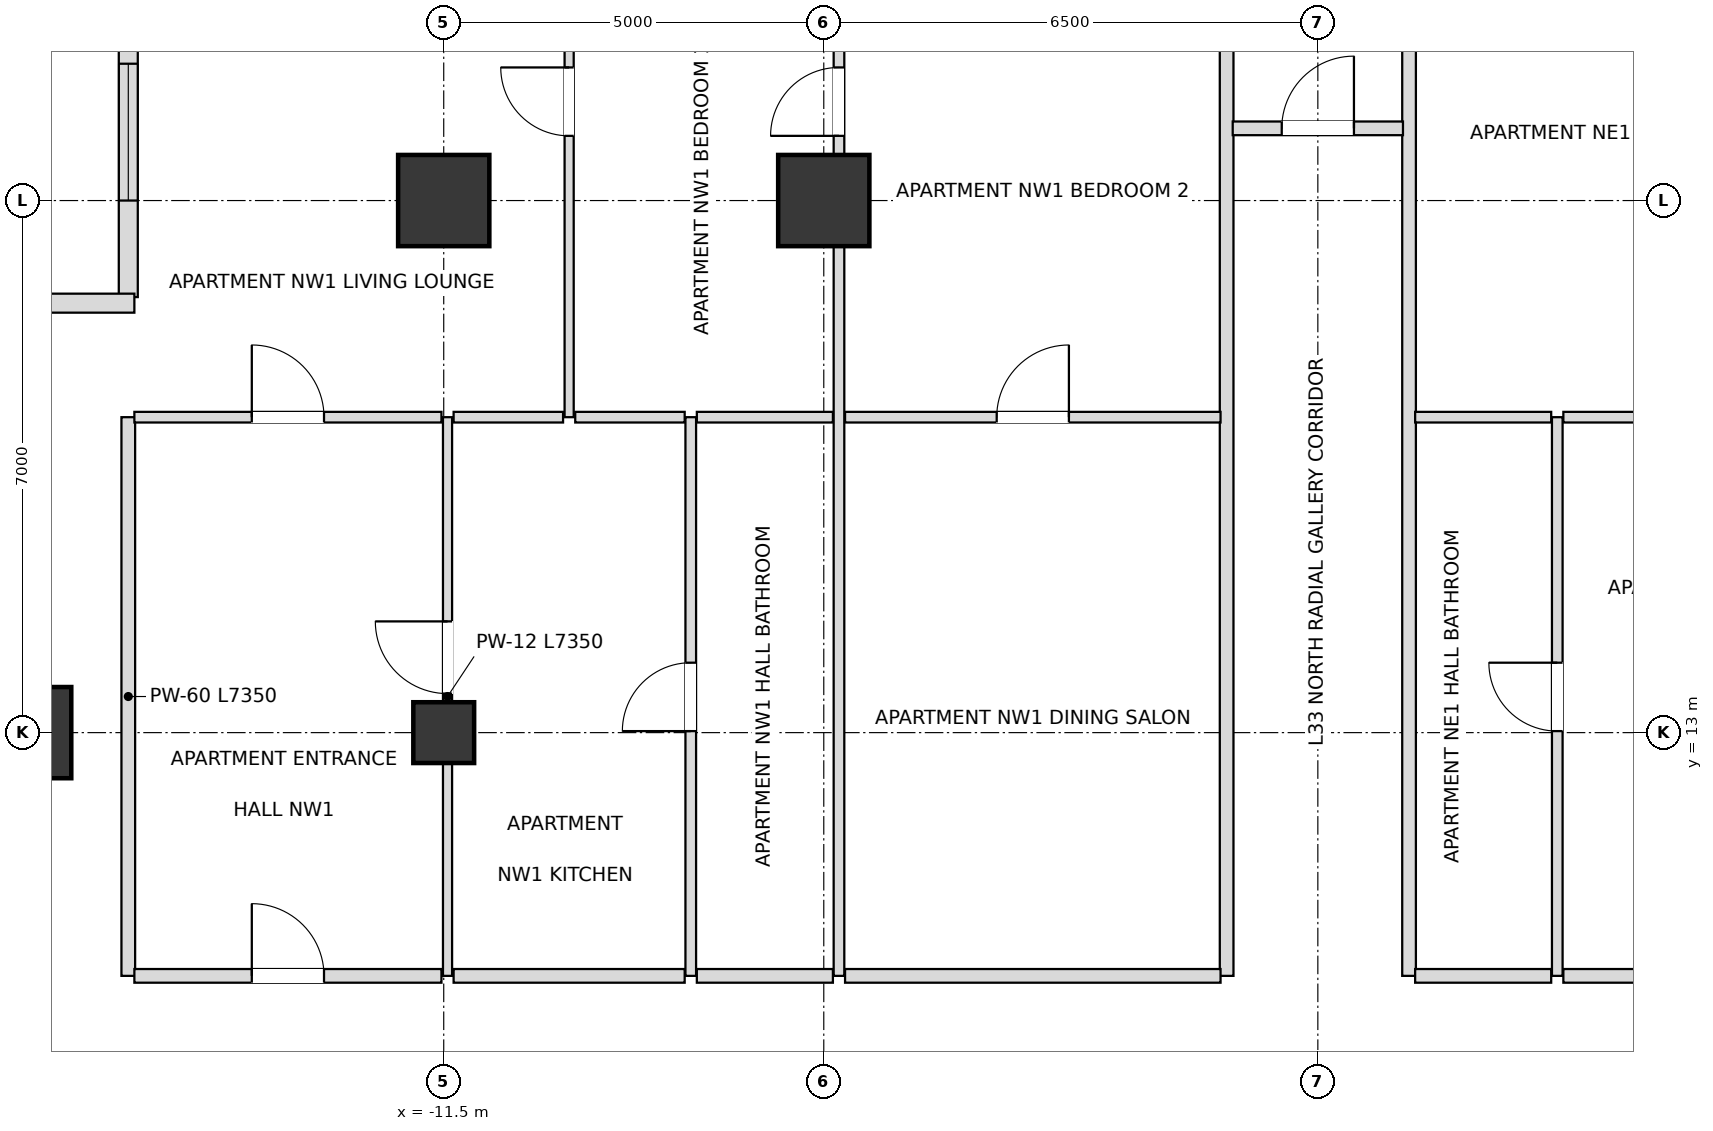
"""IFC4 building model, lengths in metres.
Left out: names, types, materials, properties, quantities, classifications, styles, units other than length and angle.
Written with IfcOpenShell. Run it as: python <this file> out.ifc"""

import sys

from ifc_helpers import new_model, si_unit, direction, frame, frame_2d, origin, origin_2d, place, context, subcontext, project, spatial, rectangle, extrude, element, fill, save


model = new_model("IFC4")
c1 = context("Model", 3, precision=1e-05, world=origin(), true_north=direction((0.0, 1.0)))
c2 = subcontext(c1, "Body", "Model", "MODEL_VIEW")
j1 = project(units=[si_unit("LENGTHUNIT", "METRE"), si_unit("PLANEANGLEUNIT", "RADIAN")], contexts=[c1])
p1 = place(None, origin())
s1 = spatial("IfcSite", under=j1, at=p1, CompositionType="ELEMENT")
p2 = place(p1, origin())
s2 = spatial("IfcBuilding", under=s1, at=p2, CompositionType="ELEMENT")
p3 = place(p2, frame((0.0, 0.0, 133.2)))
s3 = spatial("IfcBuildingStorey", under=s2, at=p3, CompositionType="ELEMENT", Elevation=133.2)
for number, where, z_axis, x_axis in (
    (1, (-6.5, 20.0, 0.0), (0.0, 0.0, 1.0), (1.0, 0.0, 0.0)),
    (2, (-11.5, 20.0, 0.0), (0.0, 0.0, 1.0), (1.0, 0.0, 0.0)),
    (3, (-17.0, 13.0, 0.0), (0.0, 0.0, 1.0), (1.0, 0.0, 0.0)),
):
    element("IfcColumn", number, at=place(p3, frame(where, z_axis=z_axis, x_axis=x_axis)), inside=s3, PredefinedType="USERDEFINED", context=c2, shape_type="SweptSolid", body=[
        extrude(rectangle(XDim=1.2, YDim=1.2, at=origin_2d()), origin(), (0.0, 0.0, 1.0), 3.6),
    ])
p4 = place(p3, frame((-11.5, 13.0, 0.0), z_axis=(0.0, 0.0, 1.0), x_axis=(1.0, 0.0, 0.0)))
e4 = element("IfcColumn", 4, at=p4, inside=s3, PredefinedType="COLUMN", context=c2, shape_type="SweptSolid", body=[
    extrude(rectangle(XDim=0.8, YDim=0.8, at=origin_2d()), origin(), (0.0, 0.0, 1.0), 3.6),
])
p5 = place(p3, frame((-15.65, 23.07, 0.0), z_axis=(0.0, 0.0, 1.0), x_axis=(0.0, -1.0, 0.0)))
e5 = element("IfcWall", 5, at=p5, inside=s3, PredefinedType="SOLIDWALL", context=c2, shape_type="SweptSolid", body=[
    extrude(rectangle(XDim=4.34, YDim=0.25, at=frame_2d((2.17, 0.0))), origin(), (0.0, 0.0, 1.0), 2.736),
])
p6 = place(p5, frame((1.27, 0.0, 0.72)))
e6 = element("IfcOpeningElement", 6, at=p6, cuts=e5, PredefinedType="OPENING", context=c2, shape_type="SweptSolid", body=[
    extrude(rectangle(XDim=1.8, YDim=1.68, at=frame_2d((0.9, 0.84))), frame((0.0, 0.135, 0.0), z_axis=(0.0, -1.0, 0.0), x_axis=(1.0, 0.0, 0.0)), (0.0, 0.0, 1.0), 0.27),
])
p7 = place(p3, frame((-15.57, 18.65, 0.0), z_axis=(0.0, 0.0, 1.0), x_axis=(-1.0, 0.0, 0.0)))
e7 = element("IfcWall", 7, at=p7, inside=s3, PredefinedType="SOLIDWALL", context=c2, shape_type="SweptSolid", body=[
    extrude(rectangle(XDim=4.66, YDim=0.25, at=frame_2d((2.33, 0.0))), origin(), (0.0, 0.0, 1.0), 2.736),
])
p8 = place(p7, frame((1.43, 0.0, 0.72)))
e8 = element("IfcOpeningElement", 8, at=p8, cuts=e7, PredefinedType="OPENING", context=c2, shape_type="SweptSolid", body=[
    extrude(rectangle(XDim=1.8, YDim=1.68, at=frame_2d((0.9, 0.84))), frame((0.0, 0.135, 0.0), z_axis=(0.0, -1.0, 0.0), x_axis=(1.0, 0.0, 0.0)), (0.0, 0.0, 1.0), 0.27),
])
p9 = place(p3, frame((-15.65, 9.8, 0.0), z_axis=(0.0, 0.0, 1.0), x_axis=(0.0, 1.0, 0.0)))
e9 = element("IfcWall", 9, at=p9, inside=s3, PredefinedType="PARTITIONING", context=c2, shape_type="SweptSolid", body=[
    extrude(rectangle(XDim=7.35, YDim=0.18, at=frame_2d((3.675, 0.0))), origin(), (0.0, 0.0, 1.0), 2.736),
])
p10 = place(p3, frame((-11.45, 9.8, 0.0), z_axis=(0.0, 0.0, 1.0), x_axis=(0.0, 1.0, 0.0)))
e10 = element("IfcWall", 10, at=p10, inside=s3, PredefinedType="PARTITIONING", context=c2, shape_type="SweptSolid", body=[
    extrude(rectangle(XDim=7.35, YDim=0.12, at=frame_2d((3.675, 0.0))), origin(), (0.0, 0.0, 1.0), 2.736),
])
p11 = place(p10, frame((3.713, 0.0, 0.0)))
e11 = element("IfcOpeningElement", 11, at=p11, cuts=e10, PredefinedType="OPENING", context=c2, shape_type="SweptSolid", body=[
    extrude(rectangle(XDim=0.95, YDim=2.1, at=frame_2d((0.475, 1.05))), frame((0.0, 0.07, 0.0), z_axis=(0.0, -1.0, 0.0), x_axis=(1.0, 0.0, 0.0)), (0.0, 0.0, 1.0), 0.14),
])
p12 = place(p3, frame((-9.85, 17.15, 0.0), z_axis=(0.0, 0.0, 1.0), x_axis=(0.0, 1.0, 0.0)))
e12 = element("IfcWall", 12, at=p12, inside=s3, PredefinedType="PARTITIONING", context=c2, shape_type="SweptSolid", body=[
    extrude(rectangle(XDim=6.0, YDim=0.12, at=frame_2d((3.0, 0.0))), origin(), (0.0, 0.0, 1.0), 2.816),
])
p13 = place(p12, frame((3.701, 0.0, 0.0)))
e13 = element("IfcOpeningElement", 13, at=p13, cuts=e12, PredefinedType="OPENING", context=c2, shape_type="SweptSolid", body=[
    extrude(rectangle(XDim=0.9, YDim=2.1, at=frame_2d((0.45, 1.05))), frame((0.0, 0.07, 0.0), z_axis=(0.0, -1.0, 0.0), x_axis=(1.0, 0.0, 0.0)), (0.0, 0.0, 1.0), 0.14),
])
p14 = place(p3, frame((-8.25, 9.8, 0.0), z_axis=(0.0, 0.0, 1.0), x_axis=(0.0, 1.0, 0.0)))
e14 = element("IfcWall", 14, at=p14, inside=s3, PredefinedType="PARTITIONING", context=c2, shape_type="SweptSolid", body=[
    extrude(rectangle(XDim=7.35, YDim=0.14, at=frame_2d((3.675, 0.0))), origin(), (0.0, 0.0, 1.0), 2.816),
])
p15 = place(p14, frame((3.22, 0.0, 0.0)))
e15 = element("IfcOpeningElement", 15, at=p15, cuts=e14, PredefinedType="OPENING", context=c2, shape_type="SweptSolid", body=[
    extrude(rectangle(XDim=0.9, YDim=2.1, at=frame_2d((0.45, 1.05))), frame((0.0, 0.08, 0.0), z_axis=(0.0, -1.0, 0.0), x_axis=(1.0, 0.0, 0.0)), (0.0, 0.0, 1.0), 0.16),
])
p16 = place(p3, frame((-6.3, 9.8, 0.0), z_axis=(0.0, 0.0, 1.0), x_axis=(0.0, 1.0, 0.0)))
e16 = element("IfcWall", 16, at=p16, inside=s3, PredefinedType="PARTITIONING", context=c2, shape_type="SweptSolid", body=[
    extrude(rectangle(XDim=13.35, YDim=0.14, at=frame_2d((6.675, 0.0))), origin(), (0.0, 0.0, 1.0), 2.816),
])
p17 = place(p16, frame((11.051, 0.0, 0.0)))
e17 = element("IfcOpeningElement", 17, at=p17, cuts=e16, PredefinedType="OPENING", context=c2, shape_type="SweptSolid", body=[
    extrude(rectangle(XDim=0.9, YDim=2.1, at=frame_2d((0.45, 1.05))), frame((0.0, 0.08, 0.0), z_axis=(0.0, -1.0, 0.0), x_axis=(1.0, 0.0, 0.0)), (0.0, 0.0, 1.0), 0.16),
])
for number, where, z_axis, x_axis in (
    (18, (-1.2, 9.8, 0.0), (0.0, 0.0, 1.0), (0.0, 1.0, 0.0)),
    (19, (1.2, 9.8, 0.0), (0.0, 0.0, 1.0), (0.0, 1.0, 0.0)),
):
    element("IfcWall", number, at=place(p3, frame(where, z_axis=z_axis, x_axis=x_axis)), inside=s3, PredefinedType="PARTITIONING", context=c2, shape_type="SweptSolid", body=[
        extrude(rectangle(XDim=13.35, YDim=0.18, at=frame_2d((6.675, 0.0))), origin(), (0.0, 0.0, 1.0), 2.816),
    ])
p18 = place(p3, frame((3.15, 9.8, 0.0), z_axis=(0.0, 0.0, 1.0), x_axis=(0.0, 1.0, 0.0)))
e20 = element("IfcWall", 20, at=p18, inside=s3, PredefinedType="PARTITIONING", context=c2, shape_type="SweptSolid", body=[
    extrude(rectangle(XDim=7.35, YDim=0.14, at=frame_2d((3.675, 0.0))), origin(), (0.0, 0.0, 1.0), 3.38),
])
p19 = place(p18, frame((3.22, 0.0, 0.0)))
e21 = element("IfcOpeningElement", 21, at=p19, cuts=e20, PredefinedType="OPENING", context=c2, shape_type="SweptSolid", body=[
    extrude(rectangle(XDim=0.9, YDim=2.1, at=frame_2d((0.45, 1.05))), frame((0.0, 0.08, 0.0), z_axis=(0.0, -1.0, 0.0), x_axis=(1.0, 0.0, 0.0)), (0.0, 0.0, 1.0), 0.16),
])
p20 = place(p3, frame((-15.57, 9.8, 0.0), z_axis=(0.0, 0.0, 1.0), x_axis=(1.0, 0.0, 0.0)))
e22 = element("IfcWall", 22, at=p20, inside=s3, PredefinedType="PARTITIONING", context=c2, shape_type="SweptSolid", body=[
    extrude(rectangle(XDim=4.04, YDim=0.18, at=frame_2d((2.02, 0.0))), origin(), (0.0, 0.0, 1.0), 3.38),
])
p21 = place(p20, frame((1.545, 0.0, 0.0)))
e23 = element("IfcOpeningElement", 23, at=p21, cuts=e22, PredefinedType="OPENING", context=c2, shape_type="SweptSolid", body=[
    extrude(rectangle(XDim=0.95, YDim=2.15, at=frame_2d((0.475, 1.075))), frame((0.0, 0.1, 0.0), z_axis=(0.0, -1.0, 0.0), x_axis=(1.0, 0.0, 0.0)), (0.0, 0.0, 1.0), 0.2),
])
p22 = place(p3, frame((-11.37, 9.8, 0.0), z_axis=(0.0, 0.0, 1.0), x_axis=(1.0, 0.0, 0.0)))
e24 = element("IfcWall", 24, at=p22, inside=s3, PredefinedType="PARTITIONING", context=c2, shape_type="SweptSolid", body=[
    extrude(rectangle(XDim=3.04, YDim=0.18, at=frame_2d((1.52, 0.0))), origin(), (0.0, 0.0, 1.0), 3.38),
])
p23 = place(p3, frame((-8.17, 9.8, 0.0), z_axis=(0.0, 0.0, 1.0), x_axis=(1.0, 0.0, 0.0)))
e25 = element("IfcWall", 25, at=p23, inside=s3, PredefinedType="PARTITIONING", context=c2, shape_type="SweptSolid", body=[
    extrude(rectangle(XDim=1.79, YDim=0.18, at=frame_2d((0.895, 0.0))), origin(), (0.0, 0.0, 1.0), 2.816),
])
p24 = place(p3, frame((-6.22, 9.8, 0.0), z_axis=(0.0, 0.0, 1.0), x_axis=(1.0, 0.0, 0.0)))
e26 = element("IfcWall", 26, at=p24, inside=s3, PredefinedType="PARTITIONING", context=c2, shape_type="SweptSolid", body=[
    extrude(rectangle(XDim=4.94, YDim=0.18, at=frame_2d((2.47, 0.0))), origin(), (0.0, 0.0, 1.0), 3.38),
])
p25 = place(p3, frame((1.28, 9.8, 0.0), z_axis=(0.0, 0.0, 1.0), x_axis=(1.0, 0.0, 0.0)))
e27 = element("IfcWall", 27, at=p25, inside=s3, PredefinedType="PARTITIONING", context=c2, shape_type="SweptSolid", body=[
    extrude(rectangle(XDim=1.79, YDim=0.18, at=frame_2d((0.895, 0.0))), origin(), (0.0, 0.0, 1.0), 3.38),
])
p26 = place(p3, frame((3.23, 9.8, 0.0), z_axis=(0.0, 0.0, 1.0), x_axis=(1.0, 0.0, 0.0)))
e28 = element("IfcWall", 28, at=p26, inside=s3, PredefinedType="PARTITIONING", context=c2, shape_type="SweptSolid", body=[
    extrude(rectangle(XDim=4.04, YDim=0.18, at=frame_2d((2.02, 0.0))), origin(), (0.0, 0.0, 1.0), 2.816),
])
p27 = place(p26, frame((1.545, 0.0, 0.0)))
e29 = element("IfcOpeningElement", 29, at=p27, cuts=e28, PredefinedType="OPENING", context=c2, shape_type="SweptSolid", body=[
    extrude(rectangle(XDim=0.95, YDim=2.15, at=frame_2d((0.475, 1.075))), frame((0.0, 0.1, 0.0), z_axis=(0.0, -1.0, 0.0), x_axis=(1.0, 0.0, 0.0)), (0.0, 0.0, 1.0), 0.2),
])
p28 = place(p3, frame((-15.57, 17.15, 0.0), z_axis=(0.0, 0.0, 1.0), x_axis=(1.0, 0.0, 0.0)))
e30 = element("IfcWall", 30, at=p28, inside=s3, PredefinedType="PARTITIONING", context=c2, shape_type="SweptSolid", body=[
    extrude(rectangle(XDim=4.04, YDim=0.14, at=frame_2d((2.02, 0.0))), origin(), (0.0, 0.0, 1.0), 2.736),
])
p29 = place(p28, frame((1.545, 0.0, 0.0)))
e31 = element("IfcOpeningElement", 31, at=p29, cuts=e30, PredefinedType="OPENING", context=c2, shape_type="SweptSolid", body=[
    extrude(rectangle(XDim=0.95, YDim=2.1, at=frame_2d((0.475, 1.05))), frame((0.0, 0.08, 0.0), z_axis=(0.0, -1.0, 0.0), x_axis=(1.0, 0.0, 0.0)), (0.0, 0.0, 1.0), 0.16),
])
p30 = place(p3, frame((-11.37, 17.15, 0.0), z_axis=(0.0, 0.0, 1.0), x_axis=(1.0, 0.0, 0.0)))
e32 = element("IfcWall", 32, at=p30, inside=s3, PredefinedType="PARTITIONING", context=c2, shape_type="SweptSolid", body=[
    extrude(rectangle(XDim=1.44, YDim=0.14, at=frame_2d((0.72, 0.0))), origin(), (0.0, 0.0, 1.0), 3.38),
])
p31 = place(p3, frame((-9.77, 17.15, 0.0), z_axis=(0.0, 0.0, 1.0), x_axis=(1.0, 0.0, 0.0)))
e33 = element("IfcWall", 33, at=p31, inside=s3, PredefinedType="PARTITIONING", context=c2, shape_type="SweptSolid", body=[
    extrude(rectangle(XDim=1.44, YDim=0.14, at=frame_2d((0.72, 0.0))), origin(), (0.0, 0.0, 1.0), 3.38),
])
p32 = place(p3, frame((-8.17, 17.15, 0.0), z_axis=(0.0, 0.0, 1.0), x_axis=(1.0, 0.0, 0.0)))
e34 = element("IfcWall", 34, at=p32, inside=s3, PredefinedType="PARTITIONING", context=c2, shape_type="SweptSolid", body=[
    extrude(rectangle(XDim=1.79, YDim=0.14, at=frame_2d((0.895, 0.0))), origin(), (0.0, 0.0, 1.0), 2.816),
])
p33 = place(p3, frame((-6.22, 17.15, 0.0), z_axis=(0.0, 0.0, 1.0), x_axis=(1.0, 0.0, 0.0)))
e35 = element("IfcWall", 35, at=p33, inside=s3, PredefinedType="PARTITIONING", context=c2, shape_type="SweptSolid", body=[
    extrude(rectangle(XDim=4.94, YDim=0.14, at=frame_2d((2.47, 0.0))), origin(), (0.0, 0.0, 1.0), 3.38),
])
p34 = place(p33, frame((1.995, 0.0, 0.0)))
e36 = element("IfcOpeningElement", 36, at=p34, cuts=e35, PredefinedType="OPENING", context=c2, shape_type="SweptSolid", body=[
    extrude(rectangle(XDim=0.95, YDim=2.1, at=frame_2d((0.475, 1.05))), frame((0.0, 0.08, 0.0), z_axis=(0.0, -1.0, 0.0), x_axis=(1.0, 0.0, 0.0)), (0.0, 0.0, 1.0), 0.16),
])
p35 = place(p3, frame((1.28, 17.15, 0.0), z_axis=(0.0, 0.0, 1.0), x_axis=(1.0, 0.0, 0.0)))
e37 = element("IfcWall", 37, at=p35, inside=s3, PredefinedType="PARTITIONING", context=c2, shape_type="SweptSolid", body=[
    extrude(rectangle(XDim=1.79, YDim=0.14, at=frame_2d((0.895, 0.0))), origin(), (0.0, 0.0, 1.0), 3.38),
])
p36 = place(p3, frame((3.23, 17.15, 0.0), z_axis=(0.0, 0.0, 1.0), x_axis=(1.0, 0.0, 0.0)))
e38 = element("IfcWall", 38, at=p36, inside=s3, PredefinedType="PARTITIONING", context=c2, shape_type="SweptSolid", body=[
    extrude(rectangle(XDim=4.04, YDim=0.14, at=frame_2d((2.02, 0.0))), origin(), (0.0, 0.0, 1.0), 2.816),
])
p37 = place(p36, frame((1.545, 0.0, 0.0)))
e39 = element("IfcOpeningElement", 39, at=p37, cuts=e38, PredefinedType="OPENING", context=c2, shape_type="SweptSolid", body=[
    extrude(rectangle(XDim=0.95, YDim=2.1, at=frame_2d((0.475, 1.05))), frame((0.0, 0.08, 0.0), z_axis=(0.0, -1.0, 0.0), x_axis=(1.0, 0.0, 0.0)), (0.0, 0.0, 1.0), 0.16),
])
p38 = place(p3, frame((-1.12, 20.95, 0.0), z_axis=(0.0, 0.0, 1.0), x_axis=(1.0, 0.0, 0.0)))
e40 = element("IfcWall", 40, at=p38, inside=s3, PredefinedType="PARTITIONING", context=c2, shape_type="SweptSolid", body=[
    extrude(rectangle(XDim=2.24, YDim=0.18, at=frame_2d((1.12, 0.0))), origin(), (0.0, 0.0, 1.0), 3.38),
])
p39 = place(p38, frame((0.645, 0.0, 0.0)))
e41 = element("IfcOpeningElement", 41, at=p39, cuts=e40, PredefinedType="OPENING", context=c2, shape_type="SweptSolid", body=[
    extrude(rectangle(XDim=0.95, YDim=2.15, at=frame_2d((0.475, 1.075))), frame((0.0, 0.1, 0.0), z_axis=(0.0, -1.0, 0.0), x_axis=(1.0, 0.0, 0.0)), (0.0, 0.0, 1.0), 0.2),
])
p40 = place(p6, origin())
e42 = element("IfcWindow", 42, at=p40, inside=s3, PartitioningType="SINGLE_PANEL", PredefinedType="WINDOW", context=c2, shape_type="SweptSolid", body=[
    extrude(rectangle(XDim=1.8, YDim=1.68, at=frame_2d((0.9, 0.84))), frame((0.0, 0.03, 0.0), z_axis=(0.0, -1.0, 0.0), x_axis=(1.0, 0.0, 0.0)), (0.0, 0.0, 1.0), 0.06),
])
fill(e6, e42)
p41 = place(p39, origin())
e43 = element("IfcDoor", 43, at=p41, inside=s3, OperationType="SINGLE_SWING_RIGHT", PredefinedType="DOOR", context=c2, shape_type="SweptSolid", body=[
    extrude(rectangle(XDim=0.95, YDim=2.15, at=frame_2d((0.475, 1.075))), frame((0.0, 0.025, 0.0), z_axis=(0.0, -1.0, 0.0), x_axis=(1.0, 0.0, 0.0)), (0.0, 0.0, 1.0), 0.05),
])
fill(e41, e43)
p42 = place(p21, origin())
e44 = element("IfcDoor", 44, at=p42, inside=s3, OperationType="SINGLE_SWING_LEFT", PredefinedType="DOOR", context=c2, shape_type="SweptSolid", body=[
    extrude(rectangle(XDim=0.95, YDim=2.15, at=frame_2d((0.475, 1.075))), frame((0.0, 0.025, 0.0), z_axis=(0.0, -1.0, 0.0), x_axis=(1.0, 0.0, 0.0)), (0.0, 0.0, 1.0), 0.05),
])
fill(e23, e44)
p43 = place(p11, origin())
e45 = element("IfcDoor", 45, at=p43, inside=s3, OperationType="SINGLE_SWING_RIGHT", PredefinedType="DOOR", context=c2, shape_type="SweptSolid", body=[
    extrude(rectangle(XDim=0.95, YDim=2.1, at=frame_2d((0.475, 1.05))), frame((0.0, 0.025, 0.0), z_axis=(0.0, -1.0, 0.0), x_axis=(1.0, 0.0, 0.0)), (0.0, 0.0, 1.0), 0.05),
])
fill(e11, e45)
p44 = place(p15, origin())
e46 = element("IfcDoor", 46, at=p44, inside=s3, OperationType="SINGLE_SWING_LEFT", PredefinedType="DOOR", context=c2, shape_type="SweptSolid", body=[
    extrude(rectangle(XDim=0.9, YDim=2.1, at=frame_2d((0.45, 1.05))), frame((0.0, 0.025, 0.0), z_axis=(0.0, -1.0, 0.0), x_axis=(1.0, 0.0, 0.0)), (0.0, 0.0, 1.0), 0.05),
])
fill(e15, e46)
p45 = place(p34, origin())
e47 = element("IfcDoor", 47, at=p45, inside=s3, OperationType="SINGLE_SWING_RIGHT", PredefinedType="DOOR", context=c2, shape_type="SweptSolid", body=[
    extrude(rectangle(XDim=0.95, YDim=2.1, at=frame_2d((0.475, 1.05))), frame((0.0, 0.025, 0.0), z_axis=(0.0, -1.0, 0.0), x_axis=(1.0, 0.0, 0.0)), (0.0, 0.0, 1.0), 0.05),
])
fill(e36, e47)
p46 = place(p29, origin())
e48 = element("IfcDoor", 48, at=p46, inside=s3, OperationType="SINGLE_SWING_LEFT", PredefinedType="DOOR", context=c2, shape_type="SweptSolid", body=[
    extrude(rectangle(XDim=0.95, YDim=2.1, at=frame_2d((0.475, 1.05))), frame((0.0, 0.025, 0.0), z_axis=(0.0, -1.0, 0.0), x_axis=(1.0, 0.0, 0.0)), (0.0, 0.0, 1.0), 0.05),
])
fill(e31, e48)
p47 = place(p13, origin())
e49 = element("IfcDoor", 49, at=p47, inside=s3, OperationType="SINGLE_SWING_RIGHT", PredefinedType="DOOR", context=c2, shape_type="SweptSolid", body=[
    extrude(rectangle(XDim=0.9, YDim=2.1, at=frame_2d((0.45, 1.05))), frame((0.0, 0.025, 0.0), z_axis=(0.0, -1.0, 0.0), x_axis=(1.0, 0.0, 0.0)), (0.0, 0.0, 1.0), 0.05),
])
fill(e13, e49)
p48 = place(p17, origin())
e50 = element("IfcDoor", 50, at=p48, inside=s3, OperationType="SINGLE_SWING_LEFT", PredefinedType="DOOR", context=c2, shape_type="SweptSolid", body=[
    extrude(rectangle(XDim=0.9, YDim=2.1, at=frame_2d((0.45, 1.05))), frame((0.0, 0.025, 0.0), z_axis=(0.0, -1.0, 0.0), x_axis=(1.0, 0.0, 0.0)), (0.0, 0.0, 1.0), 0.05),
])
fill(e17, e50)
p49 = place(p19, origin())
e51 = element("IfcDoor", 51, at=p49, inside=s3, OperationType="SINGLE_SWING_RIGHT", PredefinedType="DOOR", context=c2, shape_type="SweptSolid", body=[
    extrude(rectangle(XDim=0.9, YDim=2.1, at=frame_2d((0.45, 1.05))), frame((0.0, 0.025, 0.0), z_axis=(0.0, -1.0, 0.0), x_axis=(1.0, 0.0, 0.0)), (0.0, 0.0, 1.0), 0.05),
])
fill(e21, e51)
save(model, sys.argv[1])
